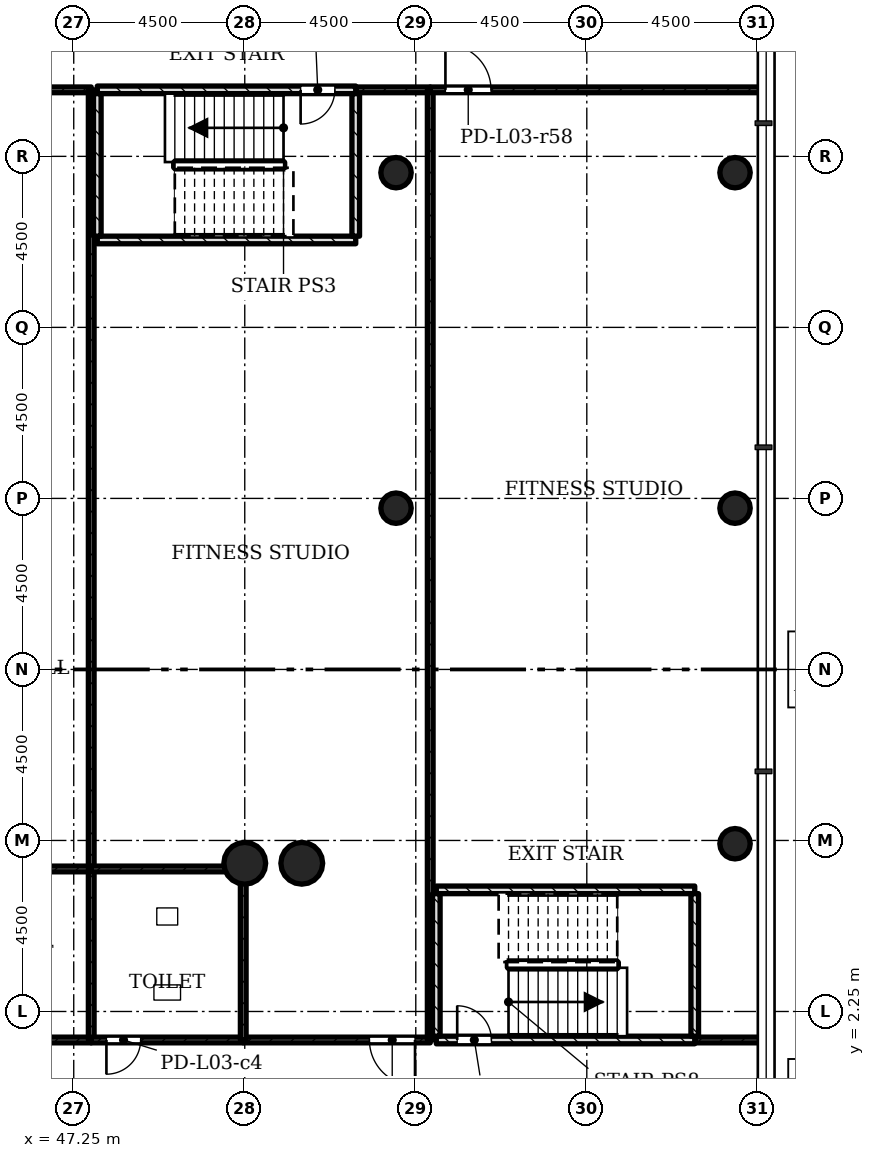
"""IFC4 building model, lengths in metres.
Left out: names, types, materials, properties, quantities, classifications, styles, units other than length and angle.
Written with IfcOpenShell. Run it as: python <this file> out.ifc"""

import sys

from ifc_helpers import new_model, si_unit, direction, frame, frame_2d, origin, origin_2d, place, context, subcontext, project, spatial, rectangle, hollow_circle, extrude, element, fill, save


model = new_model("IFC4")
c1 = context("Model", 3, precision=1e-05, world=origin(), true_north=direction((0.0, 1.0)))
c2 = subcontext(c1, "Body", "Model", "MODEL_VIEW")
j1 = project(units=[si_unit("LENGTHUNIT", "METRE"), si_unit("PLANEANGLEUNIT", "RADIAN")], contexts=[c1])
p1 = place(None, origin())
s1 = spatial("IfcSite", under=j1, at=p1, CompositionType="ELEMENT")
p2 = place(p1, origin())
s2 = spatial("IfcBuilding", under=s1, at=p2, CompositionType="ELEMENT")
p3 = place(p2, frame((0.0, 0.0, 15.5)))
s3 = spatial("IfcBuildingStorey", under=s2, at=p3, CompositionType="ELEMENT", Elevation=15.5)
for number, where, z_axis, x_axis in (
    (1, (51.75, 6.15, 0.0), (0.0, 0.0, 1.0), (1.0, 0.0, 0.0)),
    (2, (53.25, 6.15, 0.0), (0.0, 0.0, 1.0), (1.0, 0.0, 0.0)),
):
    element("IfcColumn", number, at=place(p3, frame(where, z_axis=z_axis, x_axis=x_axis)), inside=s3, PredefinedType="COLUMN", context=c2, shape_type="SweptSolid", body=[
        extrude(hollow_circle(Radius=0.55, WallThickness=0.04, at=origin_2d()), origin(), (0.0, 0.0, 1.0), 4.5),
    ])
for number, where, z_axis, x_axis in (
    (3, (64.65, 6.664, 0.0), (0.0, 0.0, 1.0), (1.0, 0.0, 0.0)),
    (4, (55.73, 15.493, 0.0), (0.0, 0.0, 1.0), (1.0, 0.0, 0.0)),
    (5, (64.65, 15.493, 0.0), (0.0, 0.0, 1.0), (1.0, 0.0, 0.0)),
    (6, (55.73, 24.321, 0.0), (0.0, 0.0, 1.0), (1.0, 0.0, 0.0)),
    (7, (64.65, 24.321, 0.0), (0.0, 0.0, 1.0), (1.0, 0.0, 0.0)),
):
    element("IfcColumn", number, at=place(p3, frame(where, z_axis=z_axis, x_axis=x_axis)), inside=s3, PredefinedType="COLUMN", context=c2, shape_type="SweptSolid", body=[
        extrude(hollow_circle(Radius=0.4, WallThickness=0.028, at=origin_2d()), origin(), (0.0, 0.0, 1.0), 4.5),
    ])
p4 = place(p3, frame((38.79, 26.5, 0.0), z_axis=(0.0, 0.0, 1.0), x_axis=(1.0, 0.0, 0.0)))
e8 = element("IfcWall", 8, at=p4, inside=s3, PredefinedType="PARTITIONING", context=c2, shape_type="SweptSolid", body=[
    extrude(rectangle(XDim=8.92, YDim=0.15, at=frame_2d((4.46, 0.0))), origin(), (0.0, 0.0, 1.0), 4.08),
])
p5 = place(p4, frame((0.4, 0.0, 0.0)))
e9 = element("IfcOpeningElement", 9, at=p5, cuts=e8, PredefinedType="OPENING", context=c2, shape_type="SweptSolid", body=[
    extrude(rectangle(XDim=1.2, YDim=2.1, at=frame_2d((0.6, 1.05))), frame((0.0, 0.085, 0.0), z_axis=(0.0, -1.0, 0.0), x_axis=(1.0, 0.0, 0.0)), (0.0, 0.0, 1.0), 0.17),
])
p6 = place(p3, frame((47.71, 26.5, 0.0), z_axis=(0.0, 0.0, 1.0), x_axis=(0.0, -1.0, 0.0)))
e10 = element("IfcWall", 10, at=p6, inside=s3, PredefinedType="PARTITIONING", context=c2, shape_type="SweptSolid", body=[
    extrude(rectangle(XDim=20.5, YDim=0.15, at=frame_2d((10.25, 0.0))), origin(), (0.0, 0.0, 1.0), 4.08),
])
p7 = place(p3, frame((54.67, 26.5, 0.0), z_axis=(0.0, 0.0, 1.0), x_axis=(1.0, 0.0, 0.0)))
e11 = element("IfcWall", 11, at=p7, inside=s3, PredefinedType="PARTITIONING", context=c2, shape_type="SweptSolid", body=[
    extrude(rectangle(XDim=1.96, YDim=0.15, at=frame_2d((0.98, 0.0))), origin(), (0.0, 0.0, 1.0), 4.08),
])
p8 = place(p3, frame((56.63, 1.5, 0.0), z_axis=(0.0, 0.0, 1.0), x_axis=(-1.0, 0.0, 0.0)))
e12 = element("IfcWall", 12, at=p8, inside=s3, PredefinedType="PARTITIONING", context=c2, shape_type="SweptSolid", body=[
    extrude(rectangle(XDim=4.92, YDim=0.15, at=frame_2d((2.46, 0.0))), origin(), (0.0, 0.0, 1.0), 4.08),
])
p9 = place(p8, frame((0.4, 0.0, 0.0)))
e13 = element("IfcOpeningElement", 13, at=p9, cuts=e12, PredefinedType="OPENING", context=c2, shape_type="SweptSolid", body=[
    extrude(rectangle(XDim=1.2, YDim=2.1, at=frame_2d((0.6, 1.05))), frame((0.0, 0.085, 0.0), z_axis=(0.0, -1.0, 0.0), x_axis=(1.0, 0.0, 0.0)), (0.0, 0.0, 1.0), 0.17),
])
p10 = place(p3, frame((56.63, 26.5, 0.0), z_axis=(0.0, 0.0, 1.0), x_axis=(0.0, -1.0, 0.0)))
e14 = element("IfcWall", 14, at=p10, inside=s3, PredefinedType="PARTITIONING", context=c2, shape_type="SweptSolid", body=[
    extrude(rectangle(XDim=25.0, YDim=0.15, at=frame_2d((12.5, 0.0))), origin(), (0.0, 0.0, 1.0), 4.08),
])
p11 = place(p3, frame((56.63, 26.5, 0.0), z_axis=(0.0, 0.0, 1.0), x_axis=(1.0, 0.0, 0.0)))
e15 = element("IfcWall", 15, at=p11, inside=s3, PredefinedType="PARTITIONING", context=c2, shape_type="SweptSolid", body=[
    extrude(rectangle(XDim=8.72, YDim=0.15, at=frame_2d((4.36, 0.0))), origin(), (0.0, 0.0, 1.0), 4.08),
])
p12 = place(p11, frame((0.4, 0.0, 0.0)))
e16 = element("IfcOpeningElement", 16, at=p12, cuts=e15, PredefinedType="OPENING", context=c2, shape_type="SweptSolid", body=[
    extrude(rectangle(XDim=1.2, YDim=2.1, at=frame_2d((0.6, 1.05))), frame((0.0, 0.085, 0.0), z_axis=(0.0, -1.0, 0.0), x_axis=(1.0, 0.0, 0.0)), (0.0, 0.0, 1.0), 0.17),
])
p13 = place(p3, frame((65.35, 1.5, 0.0), z_axis=(0.0, 0.0, 1.0), x_axis=(-1.0, 0.0, 0.0)))
e17 = element("IfcWall", 17, at=p13, inside=s3, PredefinedType="PARTITIONING", context=c2, shape_type="SweptSolid", body=[
    extrude(rectangle(XDim=1.76, YDim=0.15, at=frame_2d((0.88, 0.0))), origin(), (0.0, 0.0, 1.0), 4.08),
])
p14 = place(p3, frame((43.71, 1.5, 0.0), z_axis=(0.0, 0.0, 1.0), x_axis=(1.0, 0.0, 0.0)))
e18 = element("IfcWall", 18, at=p14, inside=s3, PredefinedType="PARTITIONING", context=c2, shape_type="SweptSolid", body=[
    extrude(rectangle(XDim=4.0, YDim=0.15, at=frame_2d((2.0, 0.0))), origin(), (0.0, 0.0, 1.0), 4.08),
])
p15 = place(p14, frame((0.4, 0.0, 0.0)))
e19 = element("IfcOpeningElement", 19, at=p15, cuts=e18, PredefinedType="OPENING", context=c2, shape_type="SweptSolid", body=[
    extrude(rectangle(XDim=0.9, YDim=2.1, at=frame_2d((0.45, 1.05))), frame((0.0, 0.085, 0.0), z_axis=(0.0, -1.0, 0.0), x_axis=(1.0, 0.0, 0.0)), (0.0, 0.0, 1.0), 0.17),
])
p16 = place(p3, frame((47.71, 6.0, 0.0), z_axis=(0.0, 0.0, 1.0), x_axis=(-1.0, 0.0, 0.0)))
e20 = element("IfcWall", 20, at=p16, inside=s3, PredefinedType="PARTITIONING", context=c2, shape_type="SweptSolid", body=[
    extrude(rectangle(XDim=4.0, YDim=0.15, at=frame_2d((2.0, 0.0))), origin(), (0.0, 0.0, 1.0), 4.08),
])
p17 = place(p3, frame((47.71, 1.5, 0.0), z_axis=(0.0, 0.0, 1.0), x_axis=(0.0, 1.0, 0.0)))
e21 = element("IfcWall", 21, at=p17, inside=s3, PredefinedType="PARTITIONING", context=c2, shape_type="SweptSolid", body=[
    extrude(rectangle(XDim=4.5, YDim=0.15, at=frame_2d((2.25, 0.0))), origin(), (0.0, 0.0, 1.0), 4.08),
])
p18 = place(p3, frame((47.71, 1.5, 0.0), z_axis=(0.0, 0.0, 1.0), x_axis=(1.0, 0.0, 0.0)))
e22 = element("IfcWall", 22, at=p18, inside=s3, PredefinedType="PARTITIONING", context=c2, shape_type="SweptSolid", body=[
    extrude(rectangle(XDim=4.0, YDim=0.15, at=frame_2d((2.0, 0.0))), origin(), (0.0, 0.0, 1.0), 4.08),
])
p19 = place(p18, frame((0.4, 0.0, 0.0)))
e23 = element("IfcOpeningElement", 23, at=p19, cuts=e22, PredefinedType="OPENING", context=c2, shape_type="SweptSolid", body=[
    extrude(rectangle(XDim=0.9, YDim=2.1, at=frame_2d((0.45, 1.05))), frame((0.0, 0.085, 0.0), z_axis=(0.0, -1.0, 0.0), x_axis=(1.0, 0.0, 0.0)), (0.0, 0.0, 1.0), 0.17),
])
p20 = place(p3, frame((51.71, 1.5, 0.0), z_axis=(0.0, 0.0, 1.0), x_axis=(0.0, 1.0, 0.0)))
e24 = element("IfcWall", 24, at=p20, inside=s3, PredefinedType="PARTITIONING", context=c2, shape_type="SweptSolid", body=[
    extrude(rectangle(XDim=4.5, YDim=0.15, at=frame_2d((2.25, 0.0))), origin(), (0.0, 0.0, 1.0), 4.08),
])
p21 = place(p3, frame((51.71, 6.0, 0.0), z_axis=(0.0, 0.0, 1.0), x_axis=(-1.0, 0.0, 0.0)))
e25 = element("IfcWall", 25, at=p21, inside=s3, PredefinedType="PARTITIONING", context=c2, shape_type="SweptSolid", body=[
    extrude(rectangle(XDim=4.0, YDim=0.15, at=frame_2d((2.0, 0.0))), origin(), (0.0, 0.0, 1.0), 4.08),
])
p22 = place(p3, frame((47.87, 26.5, 0.0), z_axis=(0.0, 0.0, 1.0), x_axis=(1.0, 0.0, 0.0)))
e26 = element("IfcWall", 26, at=p22, inside=s3, PredefinedType="SHEAR", context=c2, shape_type="SweptSolid", body=[
    extrude(rectangle(XDim=6.8, YDim=0.2, at=frame_2d((3.4, 0.0))), origin(), (0.0, 0.0, 1.0), 4.08),
])
p23 = place(p22, frame((5.35, 0.0, 0.0)))
e27 = element("IfcOpeningElement", 27, at=p23, cuts=e26, PredefinedType="OPENING", context=c2, shape_type="SweptSolid", body=[
    extrude(rectangle(XDim=0.9, YDim=2.1, at=frame_2d((0.45, 1.05))), frame((0.0, 0.11, 0.0), z_axis=(0.0, -1.0, 0.0), x_axis=(1.0, 0.0, 0.0)), (0.0, 0.0, 1.0), 0.22),
])
p24 = place(p3, frame((47.87, 22.55, 0.0), z_axis=(0.0, 0.0, 1.0), x_axis=(1.0, 0.0, 0.0)))
e28 = element("IfcWall", 28, at=p24, inside=s3, PredefinedType="SHEAR", context=c2, shape_type="SweptSolid", body=[
    extrude(rectangle(XDim=6.8, YDim=0.2, at=frame_2d((3.4, 0.0))), origin(), (0.0, 0.0, 1.0), 4.08),
])
for number, where, z_axis, x_axis in (
    (29, (47.87, 22.65, 0.0), (0.0, 0.0, 1.0), (0.0, 1.0, 0.0)),
    (30, (54.67, 22.65, 0.0), (0.0, 0.0, 1.0), (0.0, 1.0, 0.0)),
):
    element("IfcWall", number, at=place(p3, frame(where, z_axis=z_axis, x_axis=x_axis)), inside=s3, PredefinedType="SHEAR", context=c2, shape_type="SweptSolid", body=[
        extrude(rectangle(XDim=3.75, YDim=0.2, at=frame_2d((1.875, 0.0))), origin(), (0.0, 0.0, 1.0), 4.08),
    ])
p25 = place(p3, frame((56.79, 1.5, 0.0), z_axis=(0.0, 0.0, 1.0), x_axis=(1.0, 0.0, 0.0)))
e31 = element("IfcWall", 31, at=p25, inside=s3, PredefinedType="SHEAR", context=c2, shape_type="SweptSolid", body=[
    extrude(rectangle(XDim=6.8, YDim=0.2, at=frame_2d((3.4, 0.0))), origin(), (0.0, 0.0, 1.0), 4.08),
])
p26 = place(p25, frame((0.55, 0.0, 0.0)))
e32 = element("IfcOpeningElement", 32, at=p26, cuts=e31, PredefinedType="OPENING", context=c2, shape_type="SweptSolid", body=[
    extrude(rectangle(XDim=0.9, YDim=2.1, at=frame_2d((0.45, 1.05))), frame((0.0, 0.11, 0.0), z_axis=(0.0, -1.0, 0.0), x_axis=(1.0, 0.0, 0.0)), (0.0, 0.0, 1.0), 0.22),
])
p27 = place(p3, frame((56.79, 5.45, 0.0), z_axis=(0.0, 0.0, 1.0), x_axis=(1.0, 0.0, 0.0)))
e33 = element("IfcWall", 33, at=p27, inside=s3, PredefinedType="SHEAR", context=c2, shape_type="SweptSolid", body=[
    extrude(rectangle(XDim=6.8, YDim=0.2, at=frame_2d((3.4, 0.0))), origin(), (0.0, 0.0, 1.0), 4.08),
])
for number, where, z_axis, x_axis in (
    (34, (56.79, 1.6, 0.0), (0.0, 0.0, 1.0), (0.0, 1.0, 0.0)),
    (35, (63.59, 1.6, 0.0), (0.0, 0.0, 1.0), (0.0, 1.0, 0.0)),
):
    element("IfcWall", number, at=place(p3, frame(where, z_axis=z_axis, x_axis=x_axis)), inside=s3, PredefinedType="SHEAR", context=c2, shape_type="SweptSolid", body=[
        extrude(rectangle(XDim=3.75, YDim=0.2, at=frame_2d((1.875, 0.0))), origin(), (0.0, 0.0, 1.0), 4.08),
    ])
p28 = place(p9, origin())
e36 = element("IfcDoor", 36, at=p28, inside=s3, OperationType="SINGLE_SWING_RIGHT", PredefinedType="DOOR", context=c2, shape_type="SweptSolid", body=[
    extrude(rectangle(XDim=1.2, YDim=2.1, at=frame_2d((0.6, 1.05))), frame((0.0, 0.025, 0.0), z_axis=(0.0, -1.0, 0.0), x_axis=(1.0, 0.0, 0.0)), (0.0, 0.0, 1.0), 0.05),
])
fill(e13, e36)
p29 = place(p12, origin())
e37 = element("IfcDoor", 37, at=p29, inside=s3, OperationType="SINGLE_SWING_RIGHT", PredefinedType="DOOR", context=c2, shape_type="SweptSolid", body=[
    extrude(rectangle(XDim=1.2, YDim=2.1, at=frame_2d((0.6, 1.05))), frame((0.0, 0.025, 0.0), z_axis=(0.0, -1.0, 0.0), x_axis=(1.0, 0.0, 0.0)), (0.0, 0.0, 1.0), 0.05),
])
fill(e16, e37)
p30 = place(p19, origin())
e38 = element("IfcDoor", 38, at=p30, inside=s3, OperationType="SINGLE_SWING_LEFT", PredefinedType="DOOR", context=c2, shape_type="SweptSolid", body=[
    extrude(rectangle(XDim=0.9, YDim=2.1, at=frame_2d((0.45, 1.05))), frame((0.0, 0.025, 0.0), z_axis=(0.0, -1.0, 0.0), x_axis=(1.0, 0.0, 0.0)), (0.0, 0.0, 1.0), 0.05),
])
fill(e23, e38)
p31 = place(p23, origin())
e39 = element("IfcDoor", 39, at=p31, inside=s3, OperationType="SINGLE_SWING_LEFT", PredefinedType="DOOR", context=c2, shape_type="SweptSolid", body=[
    extrude(rectangle(XDim=0.9, YDim=2.1, at=frame_2d((0.45, 1.05))), frame((0.0, 0.025, 0.0), z_axis=(0.0, -1.0, 0.0), x_axis=(1.0, 0.0, 0.0)), (0.0, 0.0, 1.0), 0.05),
])
fill(e27, e39)
p32 = place(p26, origin())
e40 = element("IfcDoor", 40, at=p32, inside=s3, OperationType="SINGLE_SWING_RIGHT", PredefinedType="DOOR", context=c2, shape_type="SweptSolid", body=[
    extrude(rectangle(XDim=0.9, YDim=2.1, at=frame_2d((0.45, 1.05))), frame((0.0, 0.025, 0.0), z_axis=(0.0, -1.0, 0.0), x_axis=(1.0, 0.0, 0.0)), (0.0, 0.0, 1.0), 0.05),
])
fill(e32, e40)
save(model, sys.argv[1])
